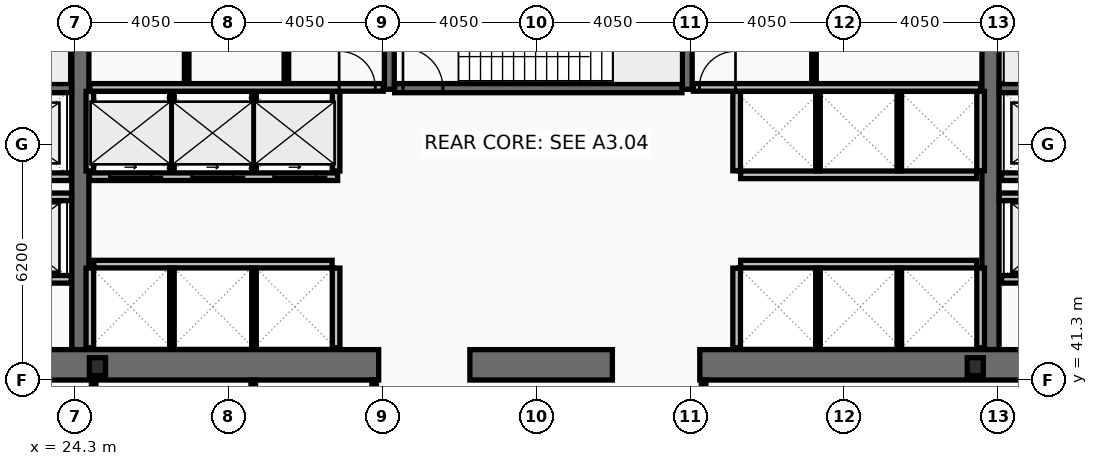
"""IFC4 building model, lengths in metres.
Left out: names, types, materials, properties, quantities, classifications, styles, units other than length and angle.
Written with IfcOpenShell. Run it as: python <this file> out.ifc"""

import sys

from ifc_helpers import new_model, si_unit, direction, frame, frame_2d, origin, origin_2d, place, context, subcontext, project, spatial, rectangle, i_section, extrude, element, fill, save


model = new_model("IFC4")
c1 = context("Model", 3, precision=1e-05, world=origin(), true_north=direction((0.0, 1.0)))
c2 = subcontext(c1, "Body", "Model", "MODEL_VIEW")
j1 = project(units=[si_unit("LENGTHUNIT", "METRE"), si_unit("PLANEANGLEUNIT", "RADIAN")], contexts=[c1])
p1 = place(None, origin())
s1 = spatial("IfcSite", under=j1, at=p1, CompositionType="ELEMENT")
p2 = place(p1, origin())
s2 = spatial("IfcBuilding", under=s1, at=p2, CompositionType="ELEMENT")
p3 = place(p2, frame((0.0, 0.0, 10.4)))
s3 = spatial("IfcBuildingStorey", under=s2, at=p3, CompositionType="ELEMENT", Elevation=10.4)
for number, where, z_axis, x_axis in (
    (1, (24.45, 42.1, 0.0), (0.0, 0.0, 1.0), (0.0, 1.0, 0.0)),
    (2, (48.4, 42.1, 0.0), (0.0, 0.0, 1.0), (0.0, 1.0, 0.0)),
):
    element("IfcWall", number, at=place(p3, frame(where, z_axis=z_axis, x_axis=x_axis)), inside=s3, PredefinedType="SHEAR", context=c2, shape_type="SweptSolid", body=[
        extrude(rectangle(XDim=10.8, YDim=0.45, at=frame_2d((5.4, 0.0))), origin(), (0.0, 0.0, 1.0), 4.8),
    ])
p4 = place(p3, frame((32.3, 41.7, 0.0), z_axis=(0.0, 0.0, 1.0), x_axis=(-1.0, 0.0, 0.0)))
e3 = element("IfcWall", 3, at=p4, inside=s3, PredefinedType="SHEAR", context=c2, shape_type="SweptSolid", body=[
    extrude(rectangle(XDim=11.45, YDim=0.8, at=frame_2d((5.725, 0.0))), origin(), (0.0, 0.0, 1.0), 4.8),
])
p5 = place(p3, frame((38.45, 41.7, 0.0), z_axis=(0.0, 0.0, 1.0), x_axis=(-1.0, 0.0, 0.0)))
e4 = element("IfcWall", 4, at=p5, inside=s3, PredefinedType="SHEAR", context=c2, shape_type="SweptSolid", body=[
    extrude(rectangle(XDim=3.75, YDim=0.8, at=frame_2d((1.875, 0.0))), origin(), (0.0, 0.0, 1.0), 4.8),
])
p6 = place(p3, frame((52.05, 41.7, 0.0), z_axis=(0.0, 0.0, 1.0), x_axis=(-1.0, 0.0, 0.0)))
e5 = element("IfcWall", 5, at=p6, inside=s3, PredefinedType="SHEAR", context=c2, shape_type="SweptSolid", body=[
    extrude(rectangle(XDim=11.3, YDim=0.8, at=frame_2d((5.65, 0.0))), origin(), (0.0, 0.0, 1.0), 4.8),
])
for number, where, z_axis, x_axis in (
    (6, (32.58, 48.95, 0.0), (0.0, 0.0, 1.0), (0.0, 1.0, 0.0)),
    (7, (40.42, 48.95, 0.0), (0.0, 0.0, 1.0), (0.0, 1.0, 0.0)),
):
    element("IfcWall", number, at=place(p3, frame(where, z_axis=z_axis, x_axis=x_axis)), inside=s3, PredefinedType="SHEAR", context=c2, shape_type="SweptSolid", body=[
        extrude(rectangle(XDim=3.95, YDim=0.26, at=frame_2d((1.975, 0.0))), origin(), (0.0, 0.0, 1.0), 4.8),
    ])
p7 = place(p3, frame((17.0, 48.98, 0.0), z_axis=(0.0, 0.0, 1.0), x_axis=(1.0, 0.0, 0.0)))
e8 = element("IfcWall", 8, at=p7, inside=s3, PredefinedType="SHEAR", context=c2, shape_type="SweptSolid", body=[
    extrude(rectangle(XDim=7.22, YDim=0.24, at=frame_2d((3.61, 0.0))), origin(), (0.0, 0.0, 1.0), 4.8),
])
p8 = place(p7, frame((0.22, 0.0, 0.0)))
e9 = element("IfcOpeningElement", 9, at=p8, cuts=e8, PredefinedType="OPENING", context=c2, shape_type="SweptSolid", body=[
    extrude(rectangle(XDim=1.05, YDim=2.15, at=frame_2d((0.525, 1.075))), frame((0.0, 0.13, 0.0), z_axis=(0.0, -1.0, 0.0), x_axis=(1.0, 0.0, 0.0)), (0.0, 0.0, 1.0), 0.26),
])
p9 = place(p3, frame((48.63, 48.98, 0.0), z_axis=(0.0, 0.0, 1.0), x_axis=(1.0, 0.0, 0.0)))
e10 = element("IfcWall", 10, at=p9, inside=s3, PredefinedType="SHEAR", context=c2, shape_type="SweptSolid", body=[
    extrude(rectangle(XDim=7.27, YDim=0.24, at=frame_2d((3.635, 0.0))), origin(), (0.0, 0.0, 1.0), 4.8),
])
p10 = place(p9, frame((6.0, 0.0, 0.0)))
e11 = element("IfcOpeningElement", 11, at=p10, cuts=e10, PredefinedType="OPENING", context=c2, shape_type="SweptSolid", body=[
    extrude(rectangle(XDim=1.05, YDim=2.15, at=frame_2d((0.525, 1.075))), frame((0.0, 0.13, 0.0), z_axis=(0.0, -1.0, 0.0), x_axis=(1.0, 0.0, 0.0)), (0.0, 0.0, 1.0), 0.26),
])
p11 = place(p3, frame((32.72, 48.98, 0.0), z_axis=(0.0, 0.0, 1.0), x_axis=(1.0, 0.0, 0.0)))
e12 = element("IfcWall", 12, at=p11, inside=s3, PredefinedType="SHEAR", context=c2, shape_type="SweptSolid", body=[
    extrude(rectangle(XDim=7.56, YDim=0.24, at=frame_2d((3.78, 0.0))), origin(), (0.0, 0.0, 1.0), 4.8),
])
p12 = place(p11, frame((0.22, 0.0, 0.0)))
e13 = element("IfcOpeningElement", 13, at=p12, cuts=e12, PredefinedType="OPENING", context=c2, shape_type="SweptSolid", body=[
    extrude(rectangle(XDim=1.05, YDim=2.15, at=frame_2d((0.525, 1.075))), frame((0.0, 0.13, 0.0), z_axis=(0.0, -1.0, 0.0), x_axis=(1.0, 0.0, 0.0)), (0.0, 0.0, 1.0), 0.26),
])
for number, where, z_axis, x_axis in (
    (14, (24.9, 41.65, 0.0), (0.0, 0.0, 1.0), (1.0, 0.0, 0.0)),
    (15, (48.0, 41.65, 0.0), (0.0, 0.0, 1.0), (1.0, 0.0, 0.0)),
):
    element("IfcColumn", number, at=place(p3, frame(where, z_axis=z_axis, x_axis=x_axis)), inside=s3, PredefinedType="COLUMN", context=c2, shape_type="SweptSolid", body=[
        extrude(i_section(OverallWidth=0.424, OverallDepth=0.474, WebThickness=0.048, FlangeThickness=0.077, at=origin_2d()), origin(), (0.0, 0.0, 1.0), 5.0),
    ])
p13 = place(p3, frame((51.61, 43.95, 0.0), z_axis=(0.0, 0.0, 1.0), x_axis=(-1.0, 0.0, 0.0)))
e16 = element("IfcWall", 16, at=p13, inside=s3, PredefinedType="PARTITIONING", context=c2, shape_type="SweptSolid", body=[
    extrude(rectangle(XDim=2.92, YDim=0.2, at=frame_2d((1.46, 0.0))), origin(), (0.0, 0.0, 1.0), 4.8),
])
p14 = place(p13, frame((0.81, 0.0, 0.0)))
e17 = element("IfcOpeningElement", 17, at=p14, cuts=e16, PredefinedType="OPENING", context=c2, shape_type="SweptSolid", body=[
    extrude(rectangle(XDim=1.3, YDim=2.18, at=frame_2d((0.65, 1.09))), frame((0.0, 0.11, 0.0), z_axis=(0.0, -1.0, 0.0), x_axis=(1.0, 0.0, 0.0)), (0.0, 0.0, 1.0), 0.22),
])
p15 = place(p3, frame((24.21, 43.95, 0.0), z_axis=(0.0, 0.0, 1.0), x_axis=(-1.0, 0.0, 0.0)))
e18 = element("IfcWall", 18, at=p15, inside=s3, PredefinedType="PARTITIONING", context=c2, shape_type="SweptSolid", body=[
    extrude(rectangle(XDim=2.97, YDim=0.2, at=frame_2d((1.485, 0.0))), origin(), (0.0, 0.0, 1.0), 4.8),
])
p16 = place(p15, frame((0.86, 0.0, 0.0)))
e19 = element("IfcOpeningElement", 19, at=p16, cuts=e18, PredefinedType="OPENING", context=c2, shape_type="SweptSolid", body=[
    extrude(rectangle(XDim=1.3, YDim=2.18, at=frame_2d((0.65, 1.09))), frame((0.0, 0.11, 0.0), z_axis=(0.0, -1.0, 0.0), x_axis=(1.0, 0.0, 0.0)), (0.0, 0.0, 1.0), 0.22),
])
p17 = place(p3, frame((51.61, 46.65, 0.0), z_axis=(0.0, 0.0, 1.0), x_axis=(-1.0, 0.0, 0.0)))
e20 = element("IfcWall", 20, at=p17, inside=s3, PredefinedType="PARTITIONING", context=c2, shape_type="SweptSolid", body=[
    extrude(rectangle(XDim=2.92, YDim=0.2, at=frame_2d((1.46, 0.0))), origin(), (0.0, 0.0, 1.0), 4.8),
])
p18 = place(p17, frame((0.86, 0.0, 0.0)))
e21 = element("IfcOpeningElement", 21, at=p18, cuts=e20, PredefinedType="OPENING", context=c2, shape_type="SweptSolid", body=[
    extrude(rectangle(XDim=1.2, YDim=2.18, at=frame_2d((0.6, 1.09))), frame((0.0, 0.11, 0.0), z_axis=(0.0, -1.0, 0.0), x_axis=(1.0, 0.0, 0.0)), (0.0, 0.0, 1.0), 0.22),
])
p19 = place(p3, frame((24.21, 46.65, 0.0), z_axis=(0.0, 0.0, 1.0), x_axis=(-1.0, 0.0, 0.0)))
e22 = element("IfcWall", 22, at=p19, inside=s3, PredefinedType="PARTITIONING", context=c2, shape_type="SweptSolid", body=[
    extrude(rectangle(XDim=2.97, YDim=0.2, at=frame_2d((1.485, 0.0))), origin(), (0.0, 0.0, 1.0), 4.8),
])
p20 = place(p19, frame((0.91, 0.0, 0.0)))
e23 = element("IfcOpeningElement", 23, at=p20, cuts=e22, PredefinedType="OPENING", context=c2, shape_type="SweptSolid", body=[
    extrude(rectangle(XDim=1.2, YDim=2.18, at=frame_2d((0.6, 1.09))), frame((0.0, 0.11, 0.0), z_axis=(0.0, -1.0, 0.0), x_axis=(1.0, 0.0, 0.0)), (0.0, 0.0, 1.0), 0.22),
])
p21 = place(p3, frame((31.22, 46.65, 0.0), z_axis=(0.0, 0.0, 1.0), x_axis=(-1.0, 0.0, 0.0)))
e24 = element("IfcWall", 24, at=p21, inside=s3, PredefinedType="PARTITIONING", context=c2, shape_type="SweptSolid", body=[
    extrude(rectangle(XDim=6.53, YDim=0.2, at=frame_2d((3.265, 0.0))), origin(), (0.0, 0.0, 1.0), 4.8),
])
p22 = place(p21, frame((4.9, 0.0, 0.0)))
e25 = element("IfcOpeningElement", 25, at=p22, cuts=e24, PredefinedType="OPENING", context=c2, shape_type="SweptSolid", body=[
    extrude(rectangle(XDim=1.1, YDim=2.18, at=frame_2d((0.55, 1.09))), frame((0.0, 0.11, 0.0), z_axis=(0.0, -1.0, 0.0), x_axis=(1.0, 0.0, 0.0)), (0.0, 0.0, 1.0), 0.22),
])
p23 = place(p21, frame((2.74, 0.0, 0.0)))
e26 = element("IfcOpeningElement", 26, at=p23, cuts=e24, PredefinedType="OPENING", context=c2, shape_type="SweptSolid", body=[
    extrude(rectangle(XDim=1.1, YDim=2.18, at=frame_2d((0.55, 1.09))), frame((0.0, 0.11, 0.0), z_axis=(0.0, -1.0, 0.0), x_axis=(1.0, 0.0, 0.0)), (0.0, 0.0, 1.0), 0.22),
])
p24 = place(p21, frame((0.58, 0.0, 0.0)))
e27 = element("IfcOpeningElement", 27, at=p24, cuts=e24, PredefinedType="OPENING", context=c2, shape_type="SweptSolid", body=[
    extrude(rectangle(XDim=1.1, YDim=2.18, at=frame_2d((0.55, 1.09))), frame((0.0, 0.11, 0.0), z_axis=(0.0, -1.0, 0.0), x_axis=(1.0, 0.0, 0.0)), (0.0, 0.0, 1.0), 0.22),
])
p25 = place(p3, frame((21.2, 46.12, 0.0), z_axis=(0.0, 0.0, 1.0), x_axis=(1.0, 0.0, 0.0)))
e28 = element("IfcWall", 28, at=p25, inside=s3, PredefinedType="PARTITIONING", context=c2, shape_type="SweptSolid", body=[
    extrude(rectangle(XDim=3.02, YDim=0.2, at=frame_2d((1.51, 0.0))), origin(), (0.0, 0.0, 1.0), 4.8),
])
p26 = place(p3, frame((48.63, 46.12, 0.0), z_axis=(0.0, 0.0, 1.0), x_axis=(1.0, 0.0, 0.0)))
e29 = element("IfcWall", 29, at=p26, inside=s3, PredefinedType="PARTITIONING", context=c2, shape_type="SweptSolid", body=[
    extrude(rectangle(XDim=3.07, YDim=0.2, at=frame_2d((1.535, 0.0))), origin(), (0.0, 0.0, 1.0), 4.8),
])
for number, where, z_axis, x_axis in (
    (30, (24.7, 46.8, 0.0), (0.0, 0.0, 1.0), (0.0, 1.0, 0.0)),
    (31, (31.18, 46.8, 0.0), (0.0, 0.0, 1.0), (0.0, 1.0, 0.0)),
):
    element("IfcWall", number, at=place(p3, frame(where, z_axis=z_axis, x_axis=x_axis)), inside=s3, PredefinedType="PARTITIONING", context=c2, shape_type="SweptSolid", body=[
        extrude(rectangle(XDim=2.095, YDim=0.2, at=frame_2d((1.047, 0.0))), origin(), (0.0, 0.0, 1.0), 4.8),
    ])
for number, where, z_axis, x_axis in (
    (32, (26.86, 46.8, 0.0), (0.0, 0.0, 1.0), (0.0, 1.0, 0.0)),
    (33, (29.02, 46.8, 0.0), (0.0, 0.0, 1.0), (0.0, 1.0, 0.0)),
):
    element("IfcWall", number, at=place(p3, frame(where, z_axis=z_axis, x_axis=x_axis)), inside=s3, PredefinedType="PARTITIONING", context=c2, shape_type="SweptSolid", body=[
        extrude(rectangle(XDim=2.095, YDim=0.12, at=frame_2d((1.047, 0.0))), origin(), (0.0, 0.0, 1.0), 4.8),
    ])
p27 = place(p3, frame((24.805, 44.35, 0.0), z_axis=(0.0, 0.0, 1.0), x_axis=(1.0, 0.0, 0.0)))
e34 = element("IfcWall", 34, at=p27, inside=s3, PredefinedType="PARTITIONING", context=c2, shape_type="SweptSolid", body=[
    extrude(rectangle(XDim=6.27, YDim=0.2, at=frame_2d((3.135, 0.0))), origin(), (0.0, 0.0, 1.0), 4.8),
])
for number, where, z_axis, x_axis in (
    (35, (24.7, 42.15, 0.0), (0.0, 0.0, 1.0), (0.0, 1.0, 0.0)),
    (36, (31.18, 42.15, 0.0), (0.0, 0.0, 1.0), (0.0, 1.0, 0.0)),
):
    element("IfcWall", number, at=place(p3, frame(where, z_axis=z_axis, x_axis=x_axis)), inside=s3, PredefinedType="PARTITIONING", context=c2, shape_type="SweptSolid", body=[
        extrude(rectangle(XDim=2.095, YDim=0.2, at=frame_2d((1.048, 0.0))), origin(), (0.0, 0.0, 1.0), 4.8),
    ])
for number, where, z_axis, x_axis in (
    (37, (26.86, 42.15, 0.0), (0.0, 0.0, 1.0), (0.0, 1.0, 0.0)),
    (38, (29.02, 42.15, 0.0), (0.0, 0.0, 1.0), (0.0, 1.0, 0.0)),
):
    element("IfcWall", number, at=place(p3, frame(where, z_axis=z_axis, x_axis=x_axis)), inside=s3, PredefinedType="PARTITIONING", context=c2, shape_type="SweptSolid", body=[
        extrude(rectangle(XDim=2.095, YDim=0.12, at=frame_2d((1.048, 0.0))), origin(), (0.0, 0.0, 1.0), 4.8),
    ])
p28 = place(p3, frame((41.825, 46.7, 0.0), z_axis=(0.0, 0.0, 1.0), x_axis=(1.0, 0.0, 0.0)))
e39 = element("IfcWall", 39, at=p28, inside=s3, PredefinedType="PARTITIONING", context=c2, shape_type="SweptSolid", body=[
    extrude(rectangle(XDim=6.21, YDim=0.2, at=frame_2d((3.105, 0.0))), origin(), (0.0, 0.0, 1.0), 4.8),
])
for number, where, z_axis, x_axis in (
    (40, (41.72, 46.805, 0.0), (0.0, 0.0, 1.0), (0.0, 1.0, 0.0)),
    (41, (48.14, 46.805, 0.0), (0.0, 0.0, 1.0), (0.0, 1.0, 0.0)),
):
    element("IfcWall", number, at=place(p3, frame(where, z_axis=z_axis, x_axis=x_axis)), inside=s3, PredefinedType="PARTITIONING", context=c2, shape_type="SweptSolid", body=[
        extrude(rectangle(XDim=2.09, YDim=0.2, at=frame_2d((1.045, 0.0))), origin(), (0.0, 0.0, 1.0), 4.8),
    ])
for number, where, z_axis, x_axis in (
    (42, (43.86, 46.805, 0.0), (0.0, 0.0, 1.0), (0.0, 1.0, 0.0)),
    (43, (46.0, 46.805, 0.0), (0.0, 0.0, 1.0), (0.0, 1.0, 0.0)),
):
    element("IfcWall", number, at=place(p3, frame(where, z_axis=z_axis, x_axis=x_axis)), inside=s3, PredefinedType="PARTITIONING", context=c2, shape_type="SweptSolid", body=[
        extrude(rectangle(XDim=2.09, YDim=0.12, at=frame_2d((1.045, 0.0))), origin(), (0.0, 0.0, 1.0), 4.8),
    ])
p29 = place(p3, frame((41.825, 44.35, 0.0), z_axis=(0.0, 0.0, 1.0), x_axis=(1.0, 0.0, 0.0)))
e44 = element("IfcWall", 44, at=p29, inside=s3, PredefinedType="PARTITIONING", context=c2, shape_type="SweptSolid", body=[
    extrude(rectangle(XDim=6.21, YDim=0.2, at=frame_2d((3.105, 0.0))), origin(), (0.0, 0.0, 1.0), 4.8),
])
for number, where, z_axis, x_axis in (
    (45, (41.72, 42.15, 0.0), (0.0, 0.0, 1.0), (0.0, 1.0, 0.0)),
    (46, (48.14, 42.15, 0.0), (0.0, 0.0, 1.0), (0.0, 1.0, 0.0)),
):
    element("IfcWall", number, at=place(p3, frame(where, z_axis=z_axis, x_axis=x_axis)), inside=s3, PredefinedType="PARTITIONING", context=c2, shape_type="SweptSolid", body=[
        extrude(rectangle(XDim=2.095, YDim=0.2, at=frame_2d((1.048, 0.0))), origin(), (0.0, 0.0, 1.0), 4.8),
    ])
for number, where, z_axis, x_axis in (
    (47, (43.86, 42.15, 0.0), (0.0, 0.0, 1.0), (0.0, 1.0, 0.0)),
    (48, (46.0, 42.15, 0.0), (0.0, 0.0, 1.0), (0.0, 1.0, 0.0)),
):
    element("IfcWall", number, at=place(p3, frame(where, z_axis=z_axis, x_axis=x_axis)), inside=s3, PredefinedType="PARTITIONING", context=c2, shape_type="SweptSolid", body=[
        extrude(rectangle(XDim=2.095, YDim=0.12, at=frame_2d((1.048, 0.0))), origin(), (0.0, 0.0, 1.0), 4.8),
    ])
p30 = place(p3, frame((24.7, 49.0, 0.0), z_axis=(0.0, 0.0, 1.0), x_axis=(1.0, 0.0, 0.0)))
e49 = element("IfcWall", 49, at=p30, inside=s3, PredefinedType="PARTITIONING", context=c2, shape_type="SweptSolid", body=[
    extrude(rectangle(XDim=7.72, YDim=0.2, at=frame_2d((3.86, 0.0))), origin(), (0.0, 0.0, 1.0), 4.8),
])
p31 = place(p30, frame((6.56, 0.0, 0.0)))
e50 = element("IfcOpeningElement", 50, at=p31, cuts=e49, PredefinedType="OPENING", context=c2, shape_type="SweptSolid", body=[
    extrude(rectangle(XDim=0.95, YDim=2.1, at=frame_2d((0.475, 1.05))), frame((0.0, 0.11, 0.0), z_axis=(0.0, -1.0, 0.0), x_axis=(1.0, 0.0, 0.0)), (0.0, 0.0, 1.0), 0.22),
])
p32 = place(p3, frame((27.248, 49.105, 0.0), z_axis=(0.0, 0.0, 1.0), x_axis=(0.0, 1.0, 0.0)))
e51 = element("IfcWall", 51, at=p32, inside=s3, PredefinedType="PARTITIONING", context=c2, shape_type="SweptSolid", body=[
    extrude(rectangle(XDim=3.69, YDim=0.12, at=frame_2d((1.845, 0.0))), origin(), (0.0, 0.0, 1.0), 4.8),
])
p33 = place(p32, frame((1.05, 0.0, 0.0)))
e52 = element("IfcOpeningElement", 52, at=p33, cuts=e51, PredefinedType="OPENING", context=c2, shape_type="SweptSolid", body=[
    extrude(rectangle(XDim=0.9, YDim=2.05, at=frame_2d((0.45, 1.025))), frame((0.0, 0.07, 0.0), z_axis=(0.0, -1.0, 0.0), x_axis=(1.0, 0.0, 0.0)), (0.0, 0.0, 1.0), 0.14),
])
p34 = place(p3, frame((29.872, 49.105, 0.0), z_axis=(0.0, 0.0, 1.0), x_axis=(0.0, 1.0, 0.0)))
e53 = element("IfcWall", 53, at=p34, inside=s3, PredefinedType="PARTITIONING", context=c2, shape_type="SweptSolid", body=[
    extrude(rectangle(XDim=3.69, YDim=0.12, at=frame_2d((1.845, 0.0))), origin(), (0.0, 0.0, 1.0), 4.8),
])
p35 = place(p34, frame((1.05, 0.0, 0.0)))
e54 = element("IfcOpeningElement", 54, at=p35, cuts=e53, PredefinedType="OPENING", context=c2, shape_type="SweptSolid", body=[
    extrude(rectangle(XDim=0.9, YDim=2.05, at=frame_2d((0.45, 1.025))), frame((0.0, 0.07, 0.0), z_axis=(0.0, -1.0, 0.0), x_axis=(1.0, 0.0, 0.0)), (0.0, 0.0, 1.0), 0.14),
])
p36 = place(p3, frame((40.58, 49.0, 0.0), z_axis=(0.0, 0.0, 1.0), x_axis=(1.0, 0.0, 0.0)))
e55 = element("IfcWall", 55, at=p36, inside=s3, PredefinedType="PARTITIONING", context=c2, shape_type="SweptSolid", body=[
    extrude(rectangle(XDim=7.56, YDim=0.2, at=frame_2d((3.78, 0.0))), origin(), (0.0, 0.0, 1.0), 4.8),
])
p37 = place(p36, frame((0.16, 0.0, 0.0)))
e56 = element("IfcOpeningElement", 56, at=p37, cuts=e55, PredefinedType="OPENING", context=c2, shape_type="SweptSolid", body=[
    extrude(rectangle(XDim=0.95, YDim=2.1, at=frame_2d((0.475, 1.05))), frame((0.0, 0.11, 0.0), z_axis=(0.0, -1.0, 0.0), x_axis=(1.0, 0.0, 0.0)), (0.0, 0.0, 1.0), 0.22),
])
p38 = place(p3, frame((43.755, 49.105, 0.0), z_axis=(0.0, 0.0, 1.0), x_axis=(0.0, 1.0, 0.0)))
e57 = element("IfcWall", 57, at=p38, inside=s3, PredefinedType="PARTITIONING", context=c2, shape_type="SweptSolid", body=[
    extrude(rectangle(XDim=3.69, YDim=0.12, at=frame_2d((1.845, 0.0))), origin(), (0.0, 0.0, 1.0), 4.8),
])
p39 = place(p38, frame((1.05, 0.0, 0.0)))
e58 = element("IfcOpeningElement", 58, at=p39, cuts=e57, PredefinedType="OPENING", context=c2, shape_type="SweptSolid", body=[
    extrude(rectangle(XDim=0.9, YDim=2.05, at=frame_2d((0.45, 1.025))), frame((0.0, 0.07, 0.0), z_axis=(0.0, -1.0, 0.0), x_axis=(1.0, 0.0, 0.0)), (0.0, 0.0, 1.0), 0.14),
])
p40 = place(p3, frame((24.8, 38.28, 0.0), z_axis=(0.0, 0.0, 1.0), x_axis=(0.0, 1.0, 0.0)))
e59 = element("IfcWall", 59, at=p40, inside=s3, PredefinedType="PARTITIONING", context=c2, shape_type="SweptSolid", body=[
    extrude(rectangle(XDim=3.02, YDim=0.12, at=frame_2d((1.51, 0.0))), origin(), (0.0, 0.0, 1.0), 3.89),
])
for number, where, z_axis, x_axis in (
    (60, (29.0, 38.28, 0.0), (0.0, 0.0, 1.0), (0.0, 1.0, 0.0)),
    (61, (32.18, 38.28, 0.0), (0.0, 0.0, 1.0), (0.0, 1.0, 0.0)),
    (62, (40.85, 38.28, 0.0), (0.0, 0.0, 1.0), (0.0, 1.0, 0.0)),
):
    element("IfcWall", number, at=place(p3, frame(where, z_axis=z_axis, x_axis=x_axis)), inside=s3, PredefinedType="PARTITIONING", context=c2, shape_type="SweptSolid", body=[
        extrude(rectangle(XDim=3.02, YDim=0.12, at=frame_2d((1.51, 0.0))), origin(), (0.0, 0.0, 1.0), 4.8),
    ])
p41 = place(p12, origin())
e63 = element("IfcDoor", 63, at=p41, inside=s3, OperationType="SINGLE_SWING_LEFT", PredefinedType="DOOR", context=c2, shape_type="SweptSolid", body=[
    extrude(rectangle(XDim=1.05, YDim=2.15, at=frame_2d((0.525, 1.075))), frame((0.0, 0.025, 0.0), z_axis=(0.0, -1.0, 0.0), x_axis=(1.0, 0.0, 0.0)), (0.0, 0.0, 1.0), 0.05),
])
fill(e13, e63)
p42 = place(p22, origin())
e64 = element("IfcDoor", 64, at=p42, inside=s3, OperationType="SLIDING_TO_LEFT", PredefinedType="DOOR", context=c2, shape_type="SweptSolid", body=[
    extrude(rectangle(XDim=1.1, YDim=2.18, at=frame_2d((0.55, 1.09))), frame((0.0, 0.025, 0.0), z_axis=(0.0, -1.0, 0.0), x_axis=(1.0, 0.0, 0.0)), (0.0, 0.0, 1.0), 0.05),
])
fill(e25, e64)
p43 = place(p23, origin())
e65 = element("IfcDoor", 65, at=p43, inside=s3, OperationType="SLIDING_TO_LEFT", PredefinedType="DOOR", context=c2, shape_type="SweptSolid", body=[
    extrude(rectangle(XDim=1.1, YDim=2.18, at=frame_2d((0.55, 1.09))), frame((0.0, 0.025, 0.0), z_axis=(0.0, -1.0, 0.0), x_axis=(1.0, 0.0, 0.0)), (0.0, 0.0, 1.0), 0.05),
])
fill(e26, e65)
p44 = place(p24, origin())
e66 = element("IfcDoor", 66, at=p44, inside=s3, OperationType="SLIDING_TO_LEFT", PredefinedType="DOOR", context=c2, shape_type="SweptSolid", body=[
    extrude(rectangle(XDim=1.1, YDim=2.18, at=frame_2d((0.55, 1.09))), frame((0.0, 0.025, 0.0), z_axis=(0.0, -1.0, 0.0), x_axis=(1.0, 0.0, 0.0)), (0.0, 0.0, 1.0), 0.05),
])
fill(e27, e66)
p45 = place(p31, origin())
e67 = element("IfcDoor", 67, at=p45, inside=s3, OperationType="SINGLE_SWING_LEFT", PredefinedType="DOOR", context=c2, shape_type="SweptSolid", body=[
    extrude(rectangle(XDim=0.95, YDim=2.1, at=frame_2d((0.475, 1.05))), frame((0.0, 0.025, 0.0), z_axis=(0.0, -1.0, 0.0), x_axis=(1.0, 0.0, 0.0)), (0.0, 0.0, 1.0), 0.05),
])
fill(e50, e67)
p46 = place(p37, origin())
e68 = element("IfcDoor", 68, at=p46, inside=s3, OperationType="SINGLE_SWING_RIGHT", PredefinedType="DOOR", context=c2, shape_type="SweptSolid", body=[
    extrude(rectangle(XDim=0.95, YDim=2.1, at=frame_2d((0.475, 1.05))), frame((0.0, 0.025, 0.0), z_axis=(0.0, -1.0, 0.0), x_axis=(1.0, 0.0, 0.0)), (0.0, 0.0, 1.0), 0.05),
])
fill(e56, e68)
save(model, sys.argv[1])
